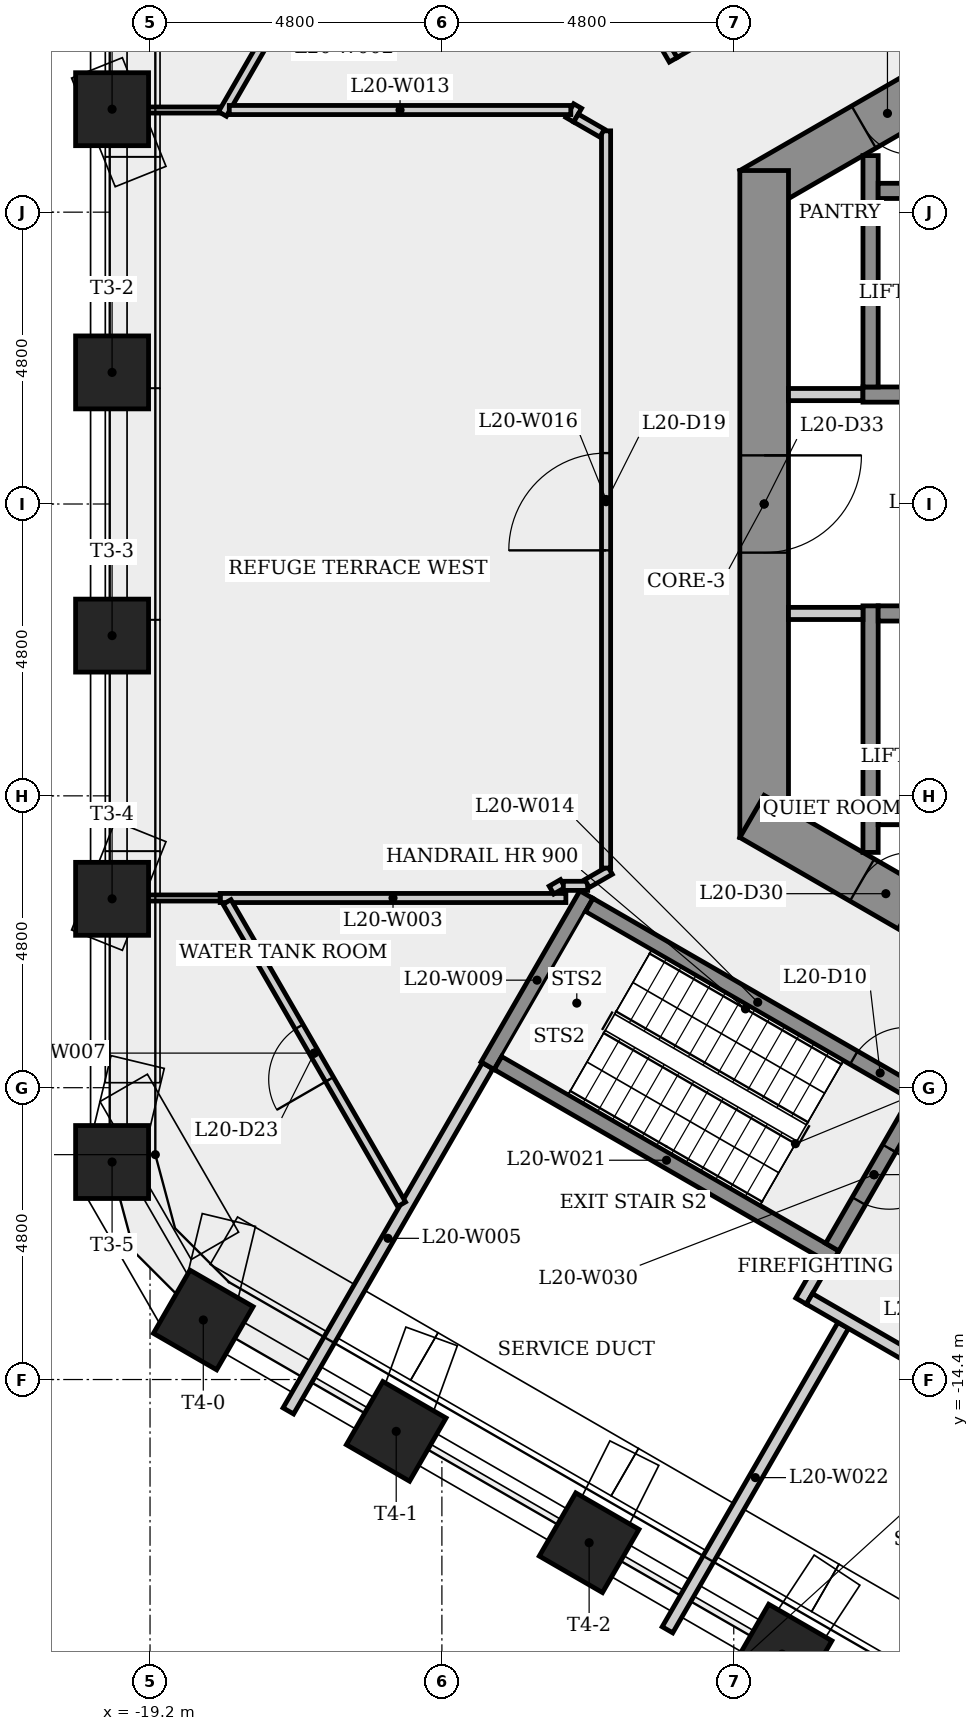
"""IFC4 building model, lengths in metres.
Left out: names, types, materials, properties, quantities, classifications, styles, units other than length and angle.
Written with IfcOpenShell. Run it as: python <this file> out.ifc"""

import sys

from ifc_helpers import new_model, si_unit, direction, frame, frame_2d, origin, origin_2d, place, context, subcontext, project, spatial, rectangle, extrude, element, fill, save


model = new_model("IFC4")
c1 = context("Model", 3, precision=1e-05, world=origin(), true_north=direction((0.0, 1.0)))
c2 = subcontext(c1, "Body", "Model", "MODEL_VIEW")
j1 = project(units=[si_unit("LENGTHUNIT", "METRE"), si_unit("PLANEANGLEUNIT", "RADIAN")], contexts=[c1])
p1 = place(None, origin())
s1 = spatial("IfcSite", under=j1, at=p1, CompositionType="ELEMENT")
p2 = place(p1, origin())
s2 = spatial("IfcBuilding", under=s1, at=p2, CompositionType="ELEMENT")
p3 = place(p2, frame((0.0, 0.0, 78.3)))
s3 = spatial("IfcBuildingStorey", under=s2, at=p3, CompositionType="ELEMENT", Elevation=78.3)
p4 = place(p3, frame((0.2, 10.623, 0.0), z_axis=(0.0, 0.0, 1.0), x_axis=(-0.866023993627, -0.500002442456, 0.0)))
e1 = element("IfcWall", 1, at=p4, inside=s3, PredefinedType="SHEAR", context=c2, shape_type="SweptSolid", body=[
    extrude(rectangle(XDim=10.97, YDim=0.8, at=frame_2d((5.485, 0.0))), origin(), (0.0, 0.0, 1.0), 4.8),
])
p5 = place(p4, frame((7.947, 0.0, 0.0)))
e2 = element("IfcOpeningElement", 2, at=p5, cuts=e1, PredefinedType="OPENING", context=c2, shape_type="SweptSolid", body=[
    extrude(rectangle(XDim=0.9, YDim=2.1, at=frame_2d((0.45, 1.05))), frame((0.0, 0.41, 0.0), z_axis=(0.0, -1.0, 0.0), x_axis=(1.0, 0.0, 0.0)), (0.0, 0.0, 1.0), 0.82),
])
p6 = place(p4, frame((1.514, 0.0, 0.0)))
e3 = element("IfcOpeningElement", 3, at=p6, cuts=e1, PredefinedType="OPENING", context=c2, shape_type="SweptSolid", body=[
    extrude(rectangle(XDim=0.9, YDim=2.1, at=frame_2d((0.45, 1.05))), frame((0.0, 0.41, 0.0), z_axis=(0.0, -1.0, 0.0), x_axis=(1.0, 0.0, 0.0)), (0.0, 0.0, 1.0), 0.82),
])
p7 = place(p3, frame((-9.1, 5.485, 0.0), z_axis=(0.0, 0.0, 1.0), x_axis=(0.0, -1.0, 0.0)))
e4 = element("IfcWall", 4, at=p7, inside=s3, PredefinedType="SHEAR", context=c2, shape_type="SweptSolid", body=[
    extrude(rectangle(XDim=10.97, YDim=0.8, at=frame_2d((5.485, 0.0))), origin(), (0.0, 0.0, 1.0), 4.8),
])
p8 = place(p7, frame((4.685, 0.0, 0.0)))
e5 = element("IfcOpeningElement", 5, at=p8, cuts=e4, PredefinedType="OPENING", context=c2, shape_type="SweptSolid", body=[
    extrude(rectangle(XDim=1.6, YDim=2.1, at=frame_2d((0.8, 1.05))), frame((0.0, 0.41, 0.0), z_axis=(0.0, -1.0, 0.0), x_axis=(1.0, 0.0, 0.0)), (0.0, 0.0, 1.0), 0.82),
])
p9 = place(p3, frame((-9.3, -5.138, 0.0), z_axis=(0.0, 0.0, 1.0), x_axis=(0.866023993627, -0.500002442456, 0.0)))
e6 = element("IfcWall", 6, at=p9, inside=s3, PredefinedType="SHEAR", context=c2, shape_type="SweptSolid", body=[
    extrude(rectangle(XDim=10.97, YDim=0.8, at=frame_2d((5.485, 0.0))), origin(), (0.0, 0.0, 1.0), 4.8),
])
p10 = place(p9, frame((2.091, 0.0, 0.0)))
e7 = element("IfcOpeningElement", 7, at=p10, cuts=e6, PredefinedType="OPENING", context=c2, shape_type="SweptSolid", body=[
    extrude(rectangle(XDim=0.9, YDim=2.1, at=frame_2d((0.45, 1.05))), frame((0.0, 0.41, 0.0), z_axis=(0.0, -1.0, 0.0), x_axis=(1.0, 0.0, 0.0)), (0.0, 0.0, 1.0), 0.82),
])
for number, where, z_axis, x_axis in (
    (8, (-19.824, 6.493, 0.0), (0.0, 0.0, 1.0), (-1.0, 0.0, 0.0)),
    (9, (-19.824, 2.165, 0.0), (0.0, 0.0, 1.0), (-1.0, 0.0, 0.0)),
    (10, (-19.824, -2.165, 0.0), (0.0, 0.0, 1.0), (-1.0, 0.0, 0.0)),
    (11, (-19.824, -6.493, 0.0), (0.0, 0.0, 1.0), (-1.0, 0.0, 0.0)),
    (12, (-19.824, -10.823, 0.0), (0.0, 0.0, 1.0), (-1.0, 0.0, 0.0)),
    (13, (-18.324, -13.421, 0.0), (0.0, 0.0, 1.0), (-0.5, -0.866, 0.0)),
    (14, (-15.151, -15.252, 0.0), (0.0, 0.0, 1.0), (-0.5, -0.866, 0.0)),
    (15, (-11.979, -17.084, 0.0), (0.0, 0.0, 1.0), (-0.5, -0.866, 0.0)),
    (16, (-8.806, -18.916, 0.0), (0.0, 0.0, 1.0), (-0.5, -0.866, 0.0)),
):
    element("IfcColumn", number, at=place(p3, frame(where, z_axis=z_axis, x_axis=x_axis)), inside=s3, PredefinedType="COLUMN", context=c2, shape_type="SweptSolid", body=[
        extrude(rectangle(XDim=1.2, YDim=1.2, at=origin_2d()), origin(), (0.0, 0.0, 1.0), 4.45),
    ])
p11 = place(p3, frame((-19.863, 6.48, 0.0), z_axis=(0.0, 0.0, 1.0), x_axis=(1.0, 0.0, 0.0)))
e17 = element("IfcWall", 17, at=p11, inside=s3, PredefinedType="PARTITIONING", context=c2, shape_type="SweptSolid", body=[
    extrude(rectangle(XDim=1.817, YDim=0.1, at=frame_2d((0.908, 0.0))), origin(), (0.0, 0.0, 1.0), 4.45),
])
p12 = place(p3, frame((-18.009, 6.415, 0.0), z_axis=(0.0, 0.0, 1.0), x_axis=(0.500010260686, 0.866019479694, 0.0)))
e18 = element("IfcWall", 18, at=p12, inside=s3, PredefinedType="PARTITIONING", context=c2, shape_type="SweptSolid", body=[
    extrude(rectangle(XDim=8.004, YDim=0.15, at=frame_2d((4.002, 0.0))), origin(), (0.0, 0.0, 1.0), 4.45),
])
p13 = place(p12, frame((3.502, 0.0, 0.0)))
e19 = element("IfcOpeningElement", 19, at=p13, cuts=e18, PredefinedType="OPENING", context=c2, shape_type="SweptSolid", body=[
    extrude(rectangle(XDim=1.0, YDim=2.1, at=frame_2d((0.5, 1.05))), frame((0.0, 0.085, 0.0), z_axis=(0.0, -1.0, 0.0), x_axis=(1.0, 0.0, 0.0)), (0.0, 0.0, 1.0), 0.17),
])
p14 = place(p3, frame((-18.046, -6.48, 0.0), z_axis=(0.0, 0.0, 1.0), x_axis=(1.0, 0.0, 0.0)))
e20 = element("IfcWall", 20, at=p14, inside=s3, PredefinedType="PARTITIONING", context=c2, shape_type="SweptSolid", body=[
    extrude(rectangle(XDim=5.685, YDim=0.15, at=frame_2d((2.843, 0.0))), origin(), (0.0, 0.0, 1.0), 4.45),
])
p15 = place(p3, frame((-18.046, -6.48, 0.0), z_axis=(0.0, 0.0, 1.0), x_axis=(-1.0, 0.0, 0.0)))
e21 = element("IfcWall", 21, at=p15, inside=s3, PredefinedType="PARTITIONING", context=c2, shape_type="SweptSolid", body=[
    extrude(rectangle(XDim=1.817, YDim=0.1, at=frame_2d((0.908, 0.0))), origin(), (0.0, 0.0, 1.0), 4.45),
])
p16 = place(p3, frame((-16.926, -14.916, 0.0), z_axis=(0.0, 0.0, 1.0), x_axis=(0.499992165211, 0.866029927155, 0.0)))
e22 = element("IfcWall", 22, at=p16, inside=s3, PredefinedType="PLUMBINGWALL", context=c2, shape_type="SweptSolid", body=[
    extrude(rectangle(XDim=6.556, YDim=0.2, at=frame_2d((3.278, 0.0))), origin(), (0.0, 0.0, 1.0), 4.45),
])
p17 = place(p3, frame((-15.063, -11.517, 0.0), z_axis=(0.0, 0.0, 1.0), x_axis=(-0.500021827193, 0.866012801482, 0.0)))
e23 = element("IfcWall", 23, at=p17, inside=s3, PredefinedType="PARTITIONING", context=c2, shape_type="SweptSolid", body=[
    extrude(rectangle(XDim=5.741, YDim=0.15, at=frame_2d((2.871, 0.0))), origin(), (0.0, 0.0, 1.0), 4.45),
])
p18 = place(p17, frame((2.371, 0.0, 0.0)))
e24 = element("IfcOpeningElement", 24, at=p18, cuts=e23, PredefinedType="OPENING", context=c2, shape_type="SweptSolid", body=[
    extrude(rectangle(XDim=1.0, YDim=2.1, at=frame_2d((0.5, 1.05))), frame((0.0, 0.085, 0.0), z_axis=(0.0, -1.0, 0.0), x_axis=(1.0, 0.0, 0.0)), (0.0, 0.0, 1.0), 0.17),
])
p19 = place(p3, frame((-14.007, 13.217, 0.0), z_axis=(0.0, 0.0, 1.0), x_axis=(0.499986710104, -0.866033076574, 0.0)))
e25 = element("IfcWall", 25, at=p19, inside=s3, PredefinedType="PARTITIONING", context=c2, shape_type="SweptSolid", body=[
    extrude(rectangle(XDim=6.824, YDim=0.15, at=frame_2d((3.412, 0.0))), origin(), (0.0, 0.0, 1.0), 4.45),
])
p20 = place(p19, frame((2.875, 0.0, 0.0)))
e26 = element("IfcOpeningElement", 26, at=p20, cuts=e25, PredefinedType="OPENING", context=c2, shape_type="SweptSolid", body=[
    extrude(rectangle(XDim=1.0, YDim=2.1, at=frame_2d((0.5, 1.05))), frame((0.0, 0.085, 0.0), z_axis=(0.0, -1.0, 0.0), x_axis=(1.0, 0.0, 0.0)), (0.0, 0.0, 1.0), 0.17),
])
p21 = place(p3, frame((-13.648, -9.239, 0.0), z_axis=(0.0, 0.0, 1.0), x_axis=(0.500017246033, 0.866015446554, 0.0)))
e27 = element("IfcWall", 27, at=p21, inside=s3, PredefinedType="SHEAR", context=c2, shape_type="SweptSolid", body=[
    extrude(rectangle(XDim=3.25, YDim=0.25, at=frame_2d((1.625, 0.0))), origin(), (0.0, 0.0, 1.0), 4.45),
])
p22 = place(p3, frame((-12.598, -6.35, 0.0), z_axis=(0.0, 0.0, 1.0), x_axis=(0.865919906206, 0.500182682664, 0.0)))
e28 = element("IfcWall", 28, at=p22, inside=s3, PredefinedType="PARTITIONING", context=c2, shape_type="SweptSolid", body=[
    extrude(rectangle(XDim=0.214, YDim=0.15, at=frame_2d((0.107, 0.0))), origin(), (0.0, 0.0, 1.0), 4.45),
])
p23 = place(p3, frame((-12.402, -6.28, 0.0), z_axis=(0.0, 0.0, 1.0), x_axis=(1.0, 0.0, 0.0)))
e29 = element("IfcWall", 29, at=p23, inside=s3, PredefinedType="PARTITIONING", context=c2, shape_type="SweptSolid", body=[
    extrude(rectangle(XDim=0.4, YDim=0.15, at=frame_2d((0.2, 0.0))), origin(), (0.0, 0.0, 1.0), 4.45),
])
p24 = place(p3, frame((-12.297, 6.32, 0.0), z_axis=(0.0, 0.0, 1.0), x_axis=(0.499885440202, 0.866091534813, 0.0)))
e30 = element("IfcWall", 30, at=p24, inside=s3, PredefinedType="PARTITIONING", context=c2, shape_type="SweptSolid", body=[
    extrude(rectangle(XDim=0.259, YDim=0.15, at=frame_2d((0.13, 0.0))), origin(), (0.0, 0.0, 1.0), 4.45),
])
p25 = place(p3, frame((-12.28, 6.48, 0.0), z_axis=(0.0, 0.0, 1.0), x_axis=(-1.0, 0.0, 0.0)))
e31 = element("IfcWall", 31, at=p25, inside=s3, PredefinedType="PARTITIONING", context=c2, shape_type="SweptSolid", body=[
    extrude(rectangle(XDim=5.616, YDim=0.15, at=frame_2d((2.808, 0.0))), origin(), (0.0, 0.0, 1.0), 4.45),
])
p26 = place(p3, frame((-11.977, -6.595, 0.0), z_axis=(0.0, 0.0, 1.0), x_axis=(0.866025499775, -0.499999833739, 0.0)))
e32 = element("IfcWall", 32, at=p26, inside=s3, PredefinedType="SHEAR", context=c2, shape_type="SweptSolid", body=[
    extrude(rectangle(XDim=6.4, YDim=0.25, at=frame_2d((3.2, 0.0))), origin(), (0.0, 0.0, 1.0), 4.45),
])
p27 = place(p26, frame((5.025, 0.0, 0.0)))
e33 = element("IfcOpeningElement", 33, at=p27, cuts=e32, PredefinedType="OPENING", context=c2, shape_type="SweptSolid", body=[
    extrude(rectangle(XDim=1.0, YDim=2.1, at=frame_2d((0.5, 1.05))), frame((0.0, 0.135, 0.0), z_axis=(0.0, -1.0, 0.0), x_axis=(1.0, 0.0, 0.0)), (0.0, 0.0, 1.0), 0.27),
])
p28 = place(p3, frame((-12.012, -6.242, 0.0), z_axis=(0.0, 0.0, 1.0), x_axis=(0.866166930732, 0.499754787977, 0.0)))
e34 = element("IfcWall", 34, at=p28, inside=s3, PredefinedType="PARTITIONING", context=c2, shape_type="SweptSolid", body=[
    extrude(rectangle(XDim=0.436, YDim=0.15, at=frame_2d((0.218, 0.0))), origin(), (0.0, 0.0, 1.0), 4.45),
])
p29 = place(p3, frame((-11.7, -5.987, 0.0), z_axis=(0.0, 0.0, 1.0), x_axis=(0.0, 1.0, 0.0)))
e35 = element("IfcWall", 35, at=p29, inside=s3, PredefinedType="PARTITIONING", context=c2, shape_type="SweptSolid", body=[
    extrude(rectangle(XDim=12.125, YDim=0.15, at=frame_2d((6.062, 0.0))), origin(), (0.0, 0.0, 1.0), 4.45),
])
p30 = place(p29, frame((5.225, 0.0, 0.0)))
e36 = element("IfcOpeningElement", 36, at=p30, cuts=e35, PredefinedType="OPENING", context=c2, shape_type="SweptSolid", body=[
    extrude(rectangle(XDim=1.6, YDim=2.1, at=frame_2d((0.8, 1.05))), frame((0.0, 0.085, 0.0), z_axis=(0.0, -1.0, 0.0), x_axis=(1.0, 0.0, 0.0)), (0.0, 0.0, 1.0), 0.17),
])
p31 = place(p3, frame((-11.765, 6.1, 0.0), z_axis=(0.0, 0.0, 1.0), x_axis=(-0.865964461276, 0.500105540669, 0.0)))
e37 = element("IfcWall", 37, at=p31, inside=s3, PredefinedType="PARTITIONING", context=c2, shape_type="SweptSolid", body=[
    extrude(rectangle(XDim=0.497, YDim=0.15, at=frame_2d((0.248, 0.0))), origin(), (0.0, 0.0, 1.0), 4.45),
])
p32 = place(p3, frame((-10.567, 7.409, 0.0), z_axis=(0.0, 0.0, 1.0), x_axis=(0.866023253344, 0.500003724654, 0.0)))
e38 = element("IfcWall", 38, at=p32, inside=s3, PredefinedType="PARTITIONING", context=c2, shape_type="SweptSolid", body=[
    extrude(rectangle(XDim=10.694, YDim=0.15, at=frame_2d((5.347, 0.0))), origin(), (0.0, 0.0, 1.0), 4.45),
])
p33 = place(p3, frame((-8.7, 1.8, 0.0), z_axis=(0.0, 0.0, 1.0), x_axis=(1.0, 0.0, 0.0)))
e39 = element("IfcWall", 39, at=p33, inside=s3, PredefinedType="PARTITIONING", context=c2, shape_type="SweptSolid", body=[
    extrude(rectangle(XDim=1.225, YDim=0.2, at=frame_2d((0.613, 0.0))), origin(), (0.0, 0.0, 1.0), 4.45),
])
p34 = place(p3, frame((-8.493, -13.11, 0.0), z_axis=(0.0, 0.0, 1.0), x_axis=(0.500067724834, 0.865986299303, 0.0)))
e40 = element("IfcWall", 40, at=p34, inside=s3, PredefinedType="PLUMBINGWALL", context=c2, shape_type="SweptSolid", body=[
    extrude(rectangle(XDim=0.775, YDim=0.2, at=frame_2d((0.388, 0.0))), origin(), (0.0, 0.0, 1.0), 4.45),
])
p35 = place(p3, frame((-7.935, -12.393, 0.0), z_axis=(0.0, 0.0, 1.0), x_axis=(-0.866025499775, 0.499999833739, 0.0)))
e41 = element("IfcWall", 41, at=p35, inside=s3, PredefinedType="SHEAR", context=c2, shape_type="SweptSolid", body=[
    extrude(rectangle(XDim=6.4, YDim=0.25, at=frame_2d((3.2, 0.0))), origin(), (0.0, 0.0, 1.0), 4.45),
])
p36 = place(p3, frame((-7.8, -13.51, 0.0), z_axis=(0.0, 0.0, 1.0), x_axis=(-0.499982030767, -0.866035778077, 0.0)))
e42 = element("IfcWall", 42, at=p36, inside=s3, PredefinedType="PLUMBINGWALL", context=c2, shape_type="SweptSolid", body=[
    extrude(rectangle(XDim=5.781, YDim=0.2, at=frame_2d((2.89, 0.0))), origin(), (0.0, 0.0, 1.0), 4.45),
])
p37 = place(p3, frame((-8.356, -13.073, 0.0), z_axis=(0.0, 0.0, 1.0), x_axis=(0.866038532462, -0.499977259774, 0.0)))
e43 = element("IfcWall", 43, at=p37, inside=s3, PredefinedType="PLUMBINGWALL", context=c2, shape_type="SweptSolid", body=[
    extrude(rectangle(XDim=4.7, YDim=0.2, at=frame_2d((2.35, 0.0))), origin(), (0.0, 0.0, 1.0), 4.45),
])
p38 = place(p3, frame((-7.475, 1.8, 0.0), z_axis=(0.0, 0.0, 1.0), x_axis=(1.0, 0.0, 0.0)))
e44 = element("IfcWall", 44, at=p38, inside=s3, PredefinedType="SHEAR", context=c2, shape_type="SweptSolid", body=[
    extrude(rectangle(XDim=14.95, YDim=0.25, at=frame_2d((7.475, 0.0))), origin(), (0.0, 0.0, 1.0), 4.45),
])
p39 = place(p3, frame((-7.35, -5.73, 0.0), z_axis=(0.0, 0.0, 1.0), x_axis=(0.0, 1.0, 0.0)))
e45 = element("IfcWall", 45, at=p39, inside=s3, PredefinedType="SHEAR", context=c2, shape_type="SweptSolid", body=[
    extrude(rectangle(XDim=4.055, YDim=0.25, at=frame_2d((2.028, 0.0))), origin(), (0.0, 0.0, 1.0), 4.45),
])
p40 = place(p3, frame((-7.35, 1.925, 0.0), z_axis=(0.0, 0.0, 1.0), x_axis=(0.0, 1.0, 0.0)))
e46 = element("IfcWall", 46, at=p40, inside=s3, PredefinedType="SHEAR", context=c2, shape_type="SweptSolid", body=[
    extrude(rectangle(XDim=3.805, YDim=0.25, at=frame_2d((1.903, 0.0))), origin(), (0.0, 0.0, 1.0), 4.45),
])
p41 = place(p3, frame((-7.225, 5.15, 0.0), z_axis=(0.0, 0.0, 1.0), x_axis=(1.0, 0.0, 0.0)))
e47 = element("IfcWall", 47, at=p41, inside=s3, PredefinedType="SHEAR", context=c2, shape_type="SweptSolid", body=[
    extrude(rectangle(XDim=14.7, YDim=0.25, at=frame_2d((7.35, 0.0))), origin(), (0.0, 0.0, 1.0), 4.45),
])
p42 = place(p3, frame((-7.475, -1.8, 0.0), z_axis=(0.0, 0.0, 1.0), x_axis=(-1.0, 0.0, 0.0)))
e48 = element("IfcWall", 48, at=p42, inside=s3, PredefinedType="PARTITIONING", context=c2, shape_type="SweptSolid", body=[
    extrude(rectangle(XDim=1.225, YDim=0.2, at=frame_2d((0.613, 0.0))), origin(), (0.0, 0.0, 1.0), 4.45),
])
p43 = place(p3, frame((-6.605, -9.841, 0.0), z_axis=(0.0, 0.0, 1.0), x_axis=(-0.499996545922, -0.866027397988, 0.0)))
e49 = element("IfcWall", 49, at=p43, inside=s3, PredefinedType="SHEAR", context=c2, shape_type="SweptSolid", body=[
    extrude(rectangle(XDim=2.75, YDim=0.25, at=frame_2d((1.375, 0.0))), origin(), (0.0, 0.0, 1.0), 4.45),
])
p44 = place(p43, frame((0.875, 0.0, 0.0)))
e50 = element("IfcOpeningElement", 50, at=p44, cuts=e49, PredefinedType="OPENING", context=c2, shape_type="SweptSolid", body=[
    extrude(rectangle(XDim=1.0, YDim=2.1, at=frame_2d((0.5, 1.05))), frame((0.0, 0.135, 0.0), z_axis=(0.0, -1.0, 0.0), x_axis=(1.0, 0.0, 0.0)), (0.0, 0.0, 1.0), 0.27),
])
p45 = place(p3, frame((-7.225, -5.15, 0.0), z_axis=(0.0, 0.0, 1.0), x_axis=(1.0, 0.0, 0.0)))
e51 = element("IfcWall", 51, at=p45, inside=s3, PredefinedType="SHEAR", context=c2, shape_type="SweptSolid", body=[
    extrude(rectangle(XDim=14.7, YDim=0.25, at=frame_2d((7.35, 0.0))), origin(), (0.0, 0.0, 1.0), 4.45),
])
p46 = place(p3, frame((-7.225, -1.8, 0.0), z_axis=(0.0, 0.0, 1.0), x_axis=(1.0, 0.0, 0.0)))
e52 = element("IfcWall", 52, at=p46, inside=s3, PredefinedType="SHEAR", context=c2, shape_type="SweptSolid", body=[
    extrude(rectangle(XDim=14.7, YDim=0.25, at=frame_2d((7.35, 0.0))), origin(), (0.0, 0.0, 1.0), 4.45),
])
p47 = place(p46, frame((0.597, 0.0, 0.0)))
e53 = element("IfcOpeningElement", 53, at=p47, cuts=e52, PredefinedType="OPENING", context=c2, shape_type="SweptSolid", body=[
    extrude(rectangle(XDim=1.1, YDim=2.1, at=frame_2d((0.55, 1.05))), frame((0.0, 0.135, 0.0), z_axis=(0.0, -1.0, 0.0), x_axis=(1.0, 0.0, 0.0)), (0.0, 0.0, 1.0), 0.27),
])
p48 = place(p46, frame((3.0, 0.0, 0.0)))
e54 = element("IfcOpeningElement", 54, at=p48, cuts=e52, PredefinedType="OPENING", context=c2, shape_type="SweptSolid", body=[
    extrude(rectangle(XDim=1.1, YDim=2.1, at=frame_2d((0.55, 1.05))), frame((0.0, 0.135, 0.0), z_axis=(0.0, -1.0, 0.0), x_axis=(1.0, 0.0, 0.0)), (0.0, 0.0, 1.0), 0.27),
])
p49 = place(p46, frame((5.45, 0.0, 0.0)))
e55 = element("IfcOpeningElement", 55, at=p49, cuts=e52, PredefinedType="OPENING", context=c2, shape_type="SweptSolid", body=[
    extrude(rectangle(XDim=1.1, YDim=2.1, at=frame_2d((0.55, 1.05))), frame((0.0, 0.135, 0.0), z_axis=(0.0, -1.0, 0.0), x_axis=(1.0, 0.0, 0.0)), (0.0, 0.0, 1.0), 0.27),
])
p50 = place(p46, frame((7.9, 0.0, 0.0)))
e56 = element("IfcOpeningElement", 56, at=p50, cuts=e52, PredefinedType="OPENING", context=c2, shape_type="SweptSolid", body=[
    extrude(rectangle(XDim=1.1, YDim=2.1, at=frame_2d((0.55, 1.05))), frame((0.0, 0.135, 0.0), z_axis=(0.0, -1.0, 0.0), x_axis=(1.0, 0.0, 0.0)), (0.0, 0.0, 1.0), 0.27),
])
p51 = place(p46, frame((10.35, 0.0, 0.0)))
e57 = element("IfcOpeningElement", 57, at=p51, cuts=e52, PredefinedType="OPENING", context=c2, shape_type="SweptSolid", body=[
    extrude(rectangle(XDim=1.1, YDim=2.1, at=frame_2d((0.55, 1.05))), frame((0.0, 0.135, 0.0), z_axis=(0.0, -1.0, 0.0), x_axis=(1.0, 0.0, 0.0)), (0.0, 0.0, 1.0), 0.27),
])
p52 = place(p27, origin())
e58 = element("IfcDoor", 58, at=p52, inside=s3, OperationType="SINGLE_SWING_RIGHT", PredefinedType="DOOR", context=c2, shape_type="SweptSolid", body=[
    extrude(rectangle(XDim=1.0, YDim=2.1, at=frame_2d((0.5, 1.05))), frame((0.0, 0.025, 0.0), z_axis=(0.0, -1.0, 0.0), x_axis=(1.0, 0.0, 0.0)), (0.0, 0.0, 1.0), 0.05),
])
fill(e33, e58)
p53 = place(p44, origin())
e59 = element("IfcDoor", 59, at=p53, inside=s3, OperationType="SINGLE_SWING_LEFT", PredefinedType="DOOR", context=c2, shape_type="SweptSolid", body=[
    extrude(rectangle(XDim=1.0, YDim=2.1, at=frame_2d((0.5, 1.05))), frame((0.0, 0.025, 0.0), z_axis=(0.0, -1.0, 0.0), x_axis=(1.0, 0.0, 0.0)), (0.0, 0.0, 1.0), 0.05),
])
fill(e50, e59)
p54 = place(p30, origin())
e60 = element("IfcDoor", 60, at=p54, inside=s3, OperationType="SINGLE_SWING_LEFT", PredefinedType="DOOR", context=c2, shape_type="SweptSolid", body=[
    extrude(rectangle(XDim=1.6, YDim=2.1, at=frame_2d((0.8, 1.05))), frame((0.0, 0.025, 0.0), z_axis=(0.0, -1.0, 0.0), x_axis=(1.0, 0.0, 0.0)), (0.0, 0.0, 1.0), 0.05),
])
fill(e36, e60)
p55 = place(p18, origin())
e61 = element("IfcDoor", 61, at=p55, inside=s3, OperationType="SINGLE_SWING_LEFT", PredefinedType="DOOR", context=c2, shape_type="SweptSolid", body=[
    extrude(rectangle(XDim=1.0, YDim=2.1, at=frame_2d((0.5, 1.05))), frame((0.0, 0.025, 0.0), z_axis=(0.0, -1.0, 0.0), x_axis=(1.0, 0.0, 0.0)), (0.0, 0.0, 1.0), 0.05),
])
fill(e24, e61)
p56 = place(p5, origin())
e62 = element("IfcDoor", 62, at=p56, inside=s3, OperationType="SINGLE_SWING_LEFT", PredefinedType="DOOR", context=c2, shape_type="SweptSolid", body=[
    extrude(rectangle(XDim=0.9, YDim=2.1, at=frame_2d((0.45, 1.05))), frame((0.0, 0.025, 0.0), z_axis=(0.0, -1.0, 0.0), x_axis=(1.0, 0.0, 0.0)), (0.0, 0.0, 1.0), 0.05),
])
fill(e2, e62)
p57 = place(p10, origin())
e63 = element("IfcDoor", 63, at=p57, inside=s3, OperationType="SINGLE_SWING_RIGHT", PredefinedType="DOOR", context=c2, shape_type="SweptSolid", body=[
    extrude(rectangle(XDim=0.9, YDim=2.1, at=frame_2d((0.45, 1.05))), frame((0.0, 0.025, 0.0), z_axis=(0.0, -1.0, 0.0), x_axis=(1.0, 0.0, 0.0)), (0.0, 0.0, 1.0), 0.05),
])
fill(e7, e63)
p58 = place(p8, origin())
e64 = element("IfcDoor", 64, at=p58, inside=s3, OperationType="SINGLE_SWING_LEFT", PredefinedType="DOOR", context=c2, shape_type="SweptSolid", body=[
    extrude(rectangle(XDim=1.6, YDim=2.1, at=frame_2d((0.8, 1.05))), frame((0.0, 0.025, 0.0), z_axis=(0.0, -1.0, 0.0), x_axis=(1.0, 0.0, 0.0)), (0.0, 0.0, 1.0), 0.05),
])
fill(e5, e64)
save(model, sys.argv[1])
